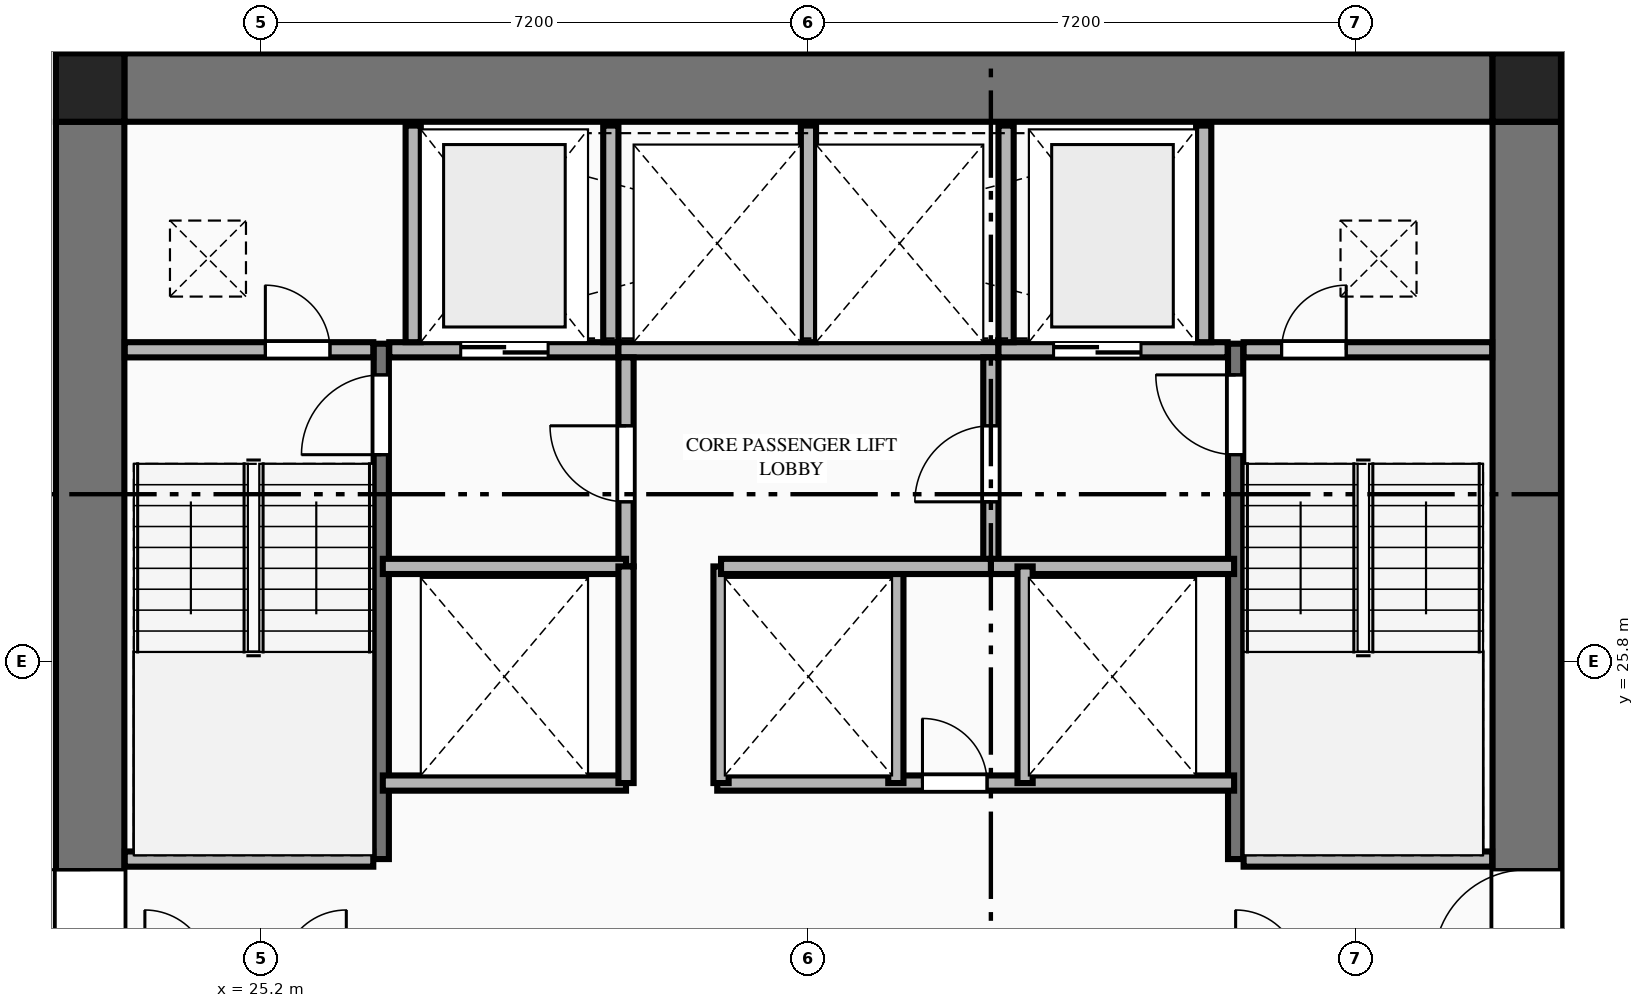
"""IFC4 building model, lengths in metres.
Left out: names, types, materials, properties, quantities, classifications, styles, units other than length and angle.
Written with IfcOpenShell. Run it as: python <this file> out.ifc"""

import sys

from ifc_helpers import new_model, si_unit, direction, frame, frame_2d, origin, origin_2d, place, context, subcontext, project, spatial, rectangle, extrude, element, fill, save


model = new_model("IFC4")
c1 = context("Model", 3, precision=1e-05, world=origin(), true_north=direction((0.0, 1.0)))
c2 = subcontext(c1, "Body", "Model", "MODEL_VIEW")
j1 = project(units=[si_unit("LENGTHUNIT", "METRE"), si_unit("PLANEANGLEUNIT", "RADIAN")], contexts=[c1])
p1 = place(None, origin())
s1 = spatial("IfcSite", under=j1, at=p1, CompositionType="ELEMENT")
p2 = place(p1, origin())
s2 = spatial("IfcBuilding", under=s1, at=p2, CompositionType="ELEMENT")
p3 = place(p2, frame((0.0, 0.0, 63.95)))
s3 = spatial("IfcBuildingStorey", under=s2, at=p3, CompositionType="ELEMENT", Elevation=63.95)
for number, where, z_axis, x_axis in (
    (1, (41.85, 33.35, 0.0), (0.0, 0.0, 1.0), (1.0, 0.0, 0.0)),
    (2, (22.95, 33.35, 0.0), (0.0, 0.0, 1.0), (1.0, 0.0, 0.0)),
):
    element("IfcColumn", number, at=place(p3, frame(where, z_axis=z_axis, x_axis=x_axis)), inside=s3, PredefinedType="COLUMN", context=c2, shape_type="SweptSolid", body=[
        extrude(rectangle(XDim=0.9, YDim=0.9, at=origin_2d()), origin(), (0.0, 0.0, 1.0), 3.55),
    ])
p4 = place(p3, frame((23.4, 33.35, 0.0), z_axis=(0.0, 0.0, 1.0), x_axis=(1.0, 0.0, 0.0)))
e3 = element("IfcWall", 3, at=p4, inside=s3, PredefinedType="SHEAR", context=c2, shape_type="SweptSolid", body=[
    extrude(rectangle(XDim=18.0, YDim=0.9, at=frame_2d((9.0, 0.0))), origin(), (0.0, 0.0, 1.0), 3.33),
])
p5 = place(p3, frame((22.95, 18.9, 0.0), z_axis=(0.0, 0.0, 1.0), x_axis=(0.0, 1.0, 0.0)))
e4 = element("IfcWall", 4, at=p5, inside=s3, PredefinedType="SHEAR", context=c2, shape_type="SweptSolid", body=[
    extrude(rectangle(XDim=14.0, YDim=0.9, at=frame_2d((7.0, 0.0))), origin(), (0.0, 0.0, 1.0), 3.33),
])
p6 = place(p5, frame((2.94, 0.0, 0.0)))
e5 = element("IfcOpeningElement", 5, at=p6, cuts=e4, PredefinedType="OPENING", context=c2, shape_type="SweptSolid", body=[
    extrude(rectangle(XDim=1.22, YDim=2.25, at=frame_2d((0.61, 1.125))), frame((0.0, 0.46, 0.0), z_axis=(0.0, -1.0, 0.0), x_axis=(1.0, 0.0, 0.0)), (0.0, 0.0, 1.0), 0.92),
])
p7 = place(p3, frame((41.85, 18.9, 0.0), z_axis=(0.0, 0.0, 1.0), x_axis=(0.0, 1.0, 0.0)))
e6 = element("IfcWall", 6, at=p7, inside=s3, PredefinedType="SHEAR", context=c2, shape_type="SweptSolid", body=[
    extrude(rectangle(XDim=14.0, YDim=0.9, at=frame_2d((7.0, 0.0))), origin(), (0.0, 0.0, 1.0), 3.33),
])
p8 = place(p7, frame((2.94, 0.0, 0.0)))
e7 = element("IfcOpeningElement", 7, at=p8, cuts=e6, PredefinedType="OPENING", context=c2, shape_type="SweptSolid", body=[
    extrude(rectangle(XDim=1.22, YDim=2.25, at=frame_2d((0.61, 1.125))), frame((0.0, 0.46, 0.0), z_axis=(0.0, -1.0, 0.0), x_axis=(1.0, 0.0, 0.0)), (0.0, 0.0, 1.0), 0.92),
])
p9 = place(p3, frame((26.78, 23.2, 0.0), z_axis=(0.0, 0.0, 1.0), x_axis=(0.0, 1.0, 0.0)))
e8 = element("IfcWall", 8, at=p9, inside=s3, PredefinedType="SHEAR", context=c2, shape_type="SweptSolid", body=[
    extrude(rectangle(XDim=6.78, YDim=0.2, at=frame_2d((3.39, 0.0))), origin(), (0.0, 0.0, 1.0), 3.55),
])
p10 = place(p9, frame((5.32, 0.0, 0.0)))
e9 = element("IfcOpeningElement", 9, at=p10, cuts=e8, PredefinedType="OPENING", context=c2, shape_type="SweptSolid", body=[
    extrude(rectangle(XDim=1.05, YDim=2.15, at=frame_2d((0.525, 1.075))), frame((0.0, 0.11, 0.0), z_axis=(0.0, -1.0, 0.0), x_axis=(1.0, 0.0, 0.0)), (0.0, 0.0, 1.0), 0.22),
])
p11 = place(p3, frame((23.405, 23.2, 0.0), z_axis=(0.0, 0.0, 1.0), x_axis=(1.0, 0.0, 0.0)))
e10 = element("IfcWall", 10, at=p11, inside=s3, PredefinedType="PLUMBINGWALL", context=c2, shape_type="SweptSolid", body=[
    extrude(rectangle(XDim=3.27, YDim=0.2, at=frame_2d((1.635, 0.0))), origin(), (0.0, 0.0, 1.0), 3.33),
])
p12 = place(p3, frame((38.02, 23.2, 0.0), z_axis=(0.0, 0.0, 1.0), x_axis=(0.0, 1.0, 0.0)))
e11 = element("IfcWall", 11, at=p12, inside=s3, PredefinedType="SHEAR", context=c2, shape_type="SweptSolid", body=[
    extrude(rectangle(XDim=6.78, YDim=0.2, at=frame_2d((3.39, 0.0))), origin(), (0.0, 0.0, 1.0), 3.55),
])
p13 = place(p12, frame((5.32, 0.0, 0.0)))
e12 = element("IfcOpeningElement", 12, at=p13, cuts=e11, PredefinedType="OPENING", context=c2, shape_type="SweptSolid", body=[
    extrude(rectangle(XDim=1.05, YDim=2.15, at=frame_2d((0.525, 1.075))), frame((0.0, 0.11, 0.0), z_axis=(0.0, -1.0, 0.0), x_axis=(1.0, 0.0, 0.0)), (0.0, 0.0, 1.0), 0.22),
])
p14 = place(p3, frame((38.125, 23.2, 0.0), z_axis=(0.0, 0.0, 1.0), x_axis=(1.0, 0.0, 0.0)))
e13 = element("IfcWall", 13, at=p14, inside=s3, PredefinedType="PLUMBINGWALL", context=c2, shape_type="SweptSolid", body=[
    extrude(rectangle(XDim=3.27, YDim=0.2, at=frame_2d((1.635, 0.0))), origin(), (0.0, 0.0, 1.0), 3.33),
])
p15 = place(p3, frame((23.405, 29.9, 0.0), z_axis=(0.0, 0.0, 1.0), x_axis=(1.0, 0.0, 0.0)))
e14 = element("IfcWall", 14, at=p15, inside=s3, PredefinedType="PLUMBINGWALL", context=c2, shape_type="SweptSolid", body=[
    extrude(rectangle(XDim=3.27, YDim=0.2, at=frame_2d((1.635, 0.0))), origin(), (0.0, 0.0, 1.0), 3.33),
])
p16 = place(p15, frame((1.85, 0.0, 0.0)))
e15 = element("IfcOpeningElement", 15, at=p16, cuts=e14, PredefinedType="OPENING", context=c2, shape_type="SweptSolid", body=[
    extrude(rectangle(XDim=0.85, YDim=2.05, at=frame_2d((0.425, 1.025))), frame((0.0, 0.11, 0.0), z_axis=(0.0, -1.0, 0.0), x_axis=(1.0, 0.0, 0.0)), (0.0, 0.0, 1.0), 0.22),
])
p17 = place(p3, frame((26.885, 29.9, 0.0), z_axis=(0.0, 0.0, 1.0), x_axis=(1.0, 0.0, 0.0)))
e16 = element("IfcWall", 16, at=p17, inside=s3, PredefinedType="PLUMBINGWALL", context=c2, shape_type="SweptSolid", body=[
    extrude(rectangle(XDim=3.015, YDim=0.2, at=frame_2d((1.507, 0.0))), origin(), (0.0, 0.0, 1.0), 3.33),
])
p18 = place(p17, frame((0.94, 0.0, 0.0)))
e17 = element("IfcOpeningElement", 17, at=p18, cuts=e16, PredefinedType="OPENING", context=c2, shape_type="SweptSolid", body=[
    extrude(rectangle(XDim=1.15, YDim=2.2, at=frame_2d((0.575, 1.1))), frame((0.0, 0.11, 0.0), z_axis=(0.0, -1.0, 0.0), x_axis=(1.0, 0.0, 0.0)), (0.0, 0.0, 1.0), 0.22),
])
p19 = place(p3, frame((29.9, 29.9, 0.0), z_axis=(0.0, 0.0, 1.0), x_axis=(1.0, 0.0, 0.0)))
e18 = element("IfcWall", 18, at=p19, inside=s3, PredefinedType="PLUMBINGWALL", context=c2, shape_type="SweptSolid", body=[
    extrude(rectangle(XDim=5.0, YDim=0.2, at=frame_2d((2.5, 0.0))), origin(), (0.0, 0.0, 1.0), 3.33),
])
p20 = place(p3, frame((34.9, 29.9, 0.0), z_axis=(0.0, 0.0, 1.0), x_axis=(1.0, 0.0, 0.0)))
e19 = element("IfcWall", 19, at=p20, inside=s3, PredefinedType="PLUMBINGWALL", context=c2, shape_type="SweptSolid", body=[
    extrude(rectangle(XDim=3.015, YDim=0.2, at=frame_2d((1.508, 0.0))), origin(), (0.0, 0.0, 1.0), 3.33),
])
p21 = place(p20, frame((0.725, 0.0, 0.0)))
e20 = element("IfcOpeningElement", 20, at=p21, cuts=e19, PredefinedType="OPENING", context=c2, shape_type="SweptSolid", body=[
    extrude(rectangle(XDim=1.15, YDim=2.2, at=frame_2d((0.575, 1.1))), frame((0.0, 0.11, 0.0), z_axis=(0.0, -1.0, 0.0), x_axis=(1.0, 0.0, 0.0)), (0.0, 0.0, 1.0), 0.22),
])
p22 = place(p3, frame((38.125, 29.9, 0.0), z_axis=(0.0, 0.0, 1.0), x_axis=(1.0, 0.0, 0.0)))
e21 = element("IfcWall", 21, at=p22, inside=s3, PredefinedType="PLUMBINGWALL", context=c2, shape_type="SweptSolid", body=[
    extrude(rectangle(XDim=3.27, YDim=0.2, at=frame_2d((1.635, 0.0))), origin(), (0.0, 0.0, 1.0), 3.33),
])
p23 = place(p22, frame((0.5, 0.0, 0.0)))
e22 = element("IfcOpeningElement", 22, at=p23, cuts=e21, PredefinedType="OPENING", context=c2, shape_type="SweptSolid", body=[
    extrude(rectangle(XDim=0.85, YDim=2.05, at=frame_2d((0.425, 1.025))), frame((0.0, 0.11, 0.0), z_axis=(0.0, -1.0, 0.0), x_axis=(1.0, 0.0, 0.0)), (0.0, 0.0, 1.0), 0.22),
])
for number, where, z_axis, x_axis in (
    (23, (27.2, 30.0, 0.0), (0.0, 0.0, 1.0), (0.0, 1.0, 0.0)),
    (24, (29.8, 30.0, 0.0), (0.0, 0.0, 1.0), (0.0, 1.0, 0.0)),
    (25, (32.4, 30.0, 0.0), (0.0, 0.0, 1.0), (0.0, 1.0, 0.0)),
    (26, (35.0, 30.0, 0.0), (0.0, 0.0, 1.0), (0.0, 1.0, 0.0)),
    (27, (37.6, 30.0, 0.0), (0.0, 0.0, 1.0), (0.0, 1.0, 0.0)),
):
    element("IfcWall", number, at=place(p3, frame(where, z_axis=z_axis, x_axis=x_axis)), inside=s3, PredefinedType="PLUMBINGWALL", context=c2, shape_type="SweptSolid", body=[
        extrude(rectangle(XDim=2.85, YDim=0.2, at=frame_2d((1.425, 0.0))), origin(), (0.0, 0.0, 1.0), 3.33),
    ])
p24 = place(p3, frame((30.0, 27.05, 0.0), z_axis=(0.0, 0.0, 1.0), x_axis=(0.0, 1.0, 0.0)))
e28 = element("IfcWall", 28, at=p24, inside=s3, PredefinedType="PLUMBINGWALL", context=c2, shape_type="SweptSolid", body=[
    extrude(rectangle(XDim=2.75, YDim=0.2, at=frame_2d((1.375, 0.0))), origin(), (0.0, 0.0, 1.0), 3.33),
])
p25 = place(p24, frame((0.85, 0.0, 0.0)))
e29 = element("IfcOpeningElement", 29, at=p25, cuts=e28, PredefinedType="OPENING", context=c2, shape_type="SweptSolid", body=[
    extrude(rectangle(XDim=1.0, YDim=2.15, at=frame_2d((0.5, 1.075))), frame((0.0, 0.11, 0.0), z_axis=(0.0, -1.0, 0.0), x_axis=(1.0, 0.0, 0.0)), (0.0, 0.0, 1.0), 0.22),
])
p26 = place(p3, frame((26.8, 27.05, 0.0), z_axis=(0.0, 0.0, 1.0), x_axis=(1.0, 0.0, 0.0)))
e30 = element("IfcWall", 30, at=p26, inside=s3, PredefinedType="PLUMBINGWALL", context=c2, shape_type="SweptSolid", body=[
    extrude(rectangle(XDim=3.2, YDim=0.2, at=frame_2d((1.6, 0.0))), origin(), (0.0, 0.0, 1.0), 3.33),
])
p27 = place(p3, frame((34.8, 27.05, 0.0), z_axis=(0.0, 0.0, 1.0), x_axis=(0.0, 1.0, 0.0)))
e31 = element("IfcWall", 31, at=p27, inside=s3, PredefinedType="PLUMBINGWALL", context=c2, shape_type="SweptSolid", body=[
    extrude(rectangle(XDim=2.75, YDim=0.2, at=frame_2d((1.375, 0.0))), origin(), (0.0, 0.0, 1.0), 3.33),
])
p28 = place(p27, frame((0.85, 0.0, 0.0)))
e32 = element("IfcOpeningElement", 32, at=p28, cuts=e31, PredefinedType="OPENING", context=c2, shape_type="SweptSolid", body=[
    extrude(rectangle(XDim=1.0, YDim=2.15, at=frame_2d((0.5, 1.075))), frame((0.0, 0.11, 0.0), z_axis=(0.0, -1.0, 0.0), x_axis=(1.0, 0.0, 0.0)), (0.0, 0.0, 1.0), 0.22),
])
for number, where, z_axis, x_axis in (
    (33, (34.8, 27.05, 0.0), (0.0, 0.0, 1.0), (1.0, 0.0, 0.0)),
    (34, (26.8, 24.2, 0.0), (0.0, 0.0, 1.0), (1.0, 0.0, 0.0)),
):
    element("IfcWall", number, at=place(p3, frame(where, z_axis=z_axis, x_axis=x_axis)), inside=s3, PredefinedType="PLUMBINGWALL", context=c2, shape_type="SweptSolid", body=[
        extrude(rectangle(XDim=3.2, YDim=0.2, at=frame_2d((1.6, 0.0))), origin(), (0.0, 0.0, 1.0), 3.33),
    ])
p29 = place(p3, frame((30.0, 24.2, 0.0), z_axis=(0.0, 0.0, 1.0), x_axis=(0.0, 1.0, 0.0)))
e35 = element("IfcWall", 35, at=p29, inside=s3, PredefinedType="PLUMBINGWALL", context=c2, shape_type="SweptSolid", body=[
    extrude(rectangle(XDim=2.85, YDim=0.2, at=frame_2d((1.425, 0.0))), origin(), (0.0, 0.0, 1.0), 3.33),
])
p30 = place(p3, frame((31.2, 24.2, 0.0), z_axis=(0.0, 0.0, 1.0), x_axis=(1.0, 0.0, 0.0)))
e36 = element("IfcWall", 36, at=p30, inside=s3, PredefinedType="PLUMBINGWALL", context=c2, shape_type="SweptSolid", body=[
    extrude(rectangle(XDim=6.8, YDim=0.2, at=frame_2d((3.4, 0.0))), origin(), (0.0, 0.0, 1.0), 3.33),
])
p31 = place(p30, frame((2.7, 0.0, 0.0)))
e37 = element("IfcOpeningElement", 37, at=p31, cuts=e36, PredefinedType="OPENING", context=c2, shape_type="SweptSolid", body=[
    extrude(rectangle(XDim=0.85, YDim=2.05, at=frame_2d((0.425, 1.025))), frame((0.0, 0.11, 0.0), z_axis=(0.0, -1.0, 0.0), x_axis=(1.0, 0.0, 0.0)), (0.0, 0.0, 1.0), 0.22),
])
for number, where, z_axis, x_axis in (
    (38, (31.25, 24.2, 0.0), (0.0, 0.0, 1.0), (0.0, 1.0, 0.0)),
    (39, (33.55, 24.2, 0.0), (0.0, 0.0, 1.0), (0.0, 1.0, 0.0)),
    (40, (35.25, 24.2, 0.0), (0.0, 0.0, 1.0), (0.0, 1.0, 0.0)),
):
    element("IfcWall", number, at=place(p3, frame(where, z_axis=z_axis, x_axis=x_axis)), inside=s3, PredefinedType="PLUMBINGWALL", context=c2, shape_type="SweptSolid", body=[
        extrude(rectangle(XDim=2.85, YDim=0.2, at=frame_2d((1.425, 0.0))), origin(), (0.0, 0.0, 1.0), 3.33),
    ])
p32 = place(p3, frame((31.25, 27.05, 0.0), z_axis=(0.0, 0.0, 1.0), x_axis=(1.0, 0.0, 0.0)))
e41 = element("IfcWall", 41, at=p32, inside=s3, PredefinedType="PLUMBINGWALL", context=c2, shape_type="SweptSolid", body=[
    extrude(rectangle(XDim=3.55, YDim=0.2, at=frame_2d((1.775, 0.0))), origin(), (0.0, 0.0, 1.0), 3.33),
])
p33 = place(p6, origin())
e42 = element("IfcDoor", 42, at=p33, inside=s3, OperationType="SINGLE_SWING_RIGHT", PredefinedType="DOOR", context=c2, shape_type="SweptSolid", body=[
    extrude(rectangle(XDim=1.22, YDim=2.25, at=frame_2d((0.61, 1.125))), frame((0.0, 0.025, 0.0), z_axis=(0.0, -1.0, 0.0), x_axis=(1.0, 0.0, 0.0)), (0.0, 0.0, 1.0), 0.05),
])
fill(e5, e42)
p34 = place(p8, origin())
e43 = element("IfcDoor", 43, at=p34, inside=s3, OperationType="SINGLE_SWING_LEFT", PredefinedType="DOOR", context=c2, shape_type="SweptSolid", body=[
    extrude(rectangle(XDim=1.22, YDim=2.25, at=frame_2d((0.61, 1.125))), frame((0.0, 0.025, 0.0), z_axis=(0.0, -1.0, 0.0), x_axis=(1.0, 0.0, 0.0)), (0.0, 0.0, 1.0), 0.05),
])
fill(e7, e43)
p35 = place(p10, origin())
e44 = element("IfcDoor", 44, at=p35, inside=s3, OperationType="SINGLE_SWING_LEFT", PredefinedType="DOOR", context=c2, shape_type="SweptSolid", body=[
    extrude(rectangle(XDim=1.05, YDim=2.15, at=frame_2d((0.525, 1.075))), frame((0.0, 0.025, 0.0), z_axis=(0.0, -1.0, 0.0), x_axis=(1.0, 0.0, 0.0)), (0.0, 0.0, 1.0), 0.05),
])
fill(e9, e44)
p36 = place(p13, origin())
e45 = element("IfcDoor", 45, at=p36, inside=s3, OperationType="SINGLE_SWING_RIGHT", PredefinedType="DOOR", context=c2, shape_type="SweptSolid", body=[
    extrude(rectangle(XDim=1.05, YDim=2.15, at=frame_2d((0.525, 1.075))), frame((0.0, 0.025, 0.0), z_axis=(0.0, -1.0, 0.0), x_axis=(1.0, 0.0, 0.0)), (0.0, 0.0, 1.0), 0.05),
])
fill(e12, e45)
p37 = place(p16, origin())
e46 = element("IfcDoor", 46, at=p37, inside=s3, OperationType="SINGLE_SWING_LEFT", PredefinedType="DOOR", context=c2, shape_type="SweptSolid", body=[
    extrude(rectangle(XDim=0.85, YDim=2.05, at=frame_2d((0.425, 1.025))), frame((0.0, 0.025, 0.0), z_axis=(0.0, -1.0, 0.0), x_axis=(1.0, 0.0, 0.0)), (0.0, 0.0, 1.0), 0.05),
])
fill(e15, e46)
p38 = place(p23, origin())
e47 = element("IfcDoor", 47, at=p38, inside=s3, OperationType="SINGLE_SWING_RIGHT", PredefinedType="DOOR", context=c2, shape_type="SweptSolid", body=[
    extrude(rectangle(XDim=0.85, YDim=2.05, at=frame_2d((0.425, 1.025))), frame((0.0, 0.025, 0.0), z_axis=(0.0, -1.0, 0.0), x_axis=(1.0, 0.0, 0.0)), (0.0, 0.0, 1.0), 0.05),
])
fill(e22, e47)
p39 = place(p18, origin())
e48 = element("IfcDoor", 48, at=p39, inside=s3, OperationType="DOUBLE_DOOR_SLIDING", PredefinedType="DOOR", context=c2, shape_type="SweptSolid", body=[
    extrude(rectangle(XDim=1.15, YDim=2.2, at=frame_2d((0.575, 1.1))), frame((0.0, 0.025, 0.0), z_axis=(0.0, -1.0, 0.0), x_axis=(1.0, 0.0, 0.0)), (0.0, 0.0, 1.0), 0.05),
])
fill(e17, e48)
p40 = place(p21, origin())
e49 = element("IfcDoor", 49, at=p40, inside=s3, OperationType="DOUBLE_DOOR_SLIDING", PredefinedType="DOOR", context=c2, shape_type="SweptSolid", body=[
    extrude(rectangle(XDim=1.15, YDim=2.2, at=frame_2d((0.575, 1.1))), frame((0.0, 0.025, 0.0), z_axis=(0.0, -1.0, 0.0), x_axis=(1.0, 0.0, 0.0)), (0.0, 0.0, 1.0), 0.05),
])
fill(e20, e49)
p41 = place(p25, origin())
e50 = element("IfcDoor", 50, at=p41, inside=s3, OperationType="SINGLE_SWING_RIGHT", PredefinedType="DOOR", context=c2, shape_type="SweptSolid", body=[
    extrude(rectangle(XDim=1.0, YDim=2.15, at=frame_2d((0.5, 1.075))), frame((0.0, 0.025, 0.0), z_axis=(0.0, -1.0, 0.0), x_axis=(1.0, 0.0, 0.0)), (0.0, 0.0, 1.0), 0.05),
])
fill(e29, e50)
p42 = place(p28, origin())
e51 = element("IfcDoor", 51, at=p42, inside=s3, OperationType="SINGLE_SWING_LEFT", PredefinedType="DOOR", context=c2, shape_type="SweptSolid", body=[
    extrude(rectangle(XDim=1.0, YDim=2.15, at=frame_2d((0.5, 1.075))), frame((0.0, 0.025, 0.0), z_axis=(0.0, -1.0, 0.0), x_axis=(1.0, 0.0, 0.0)), (0.0, 0.0, 1.0), 0.05),
])
fill(e32, e51)
p43 = place(p31, origin())
e52 = element("IfcDoor", 52, at=p43, inside=s3, OperationType="SINGLE_SWING_LEFT", PredefinedType="DOOR", context=c2, shape_type="SweptSolid", body=[
    extrude(rectangle(XDim=0.85, YDim=2.05, at=frame_2d((0.425, 1.025))), frame((0.0, 0.025, 0.0), z_axis=(0.0, -1.0, 0.0), x_axis=(1.0, 0.0, 0.0)), (0.0, 0.0, 1.0), 0.05),
])
fill(e37, e52)
save(model, sys.argv[1])
